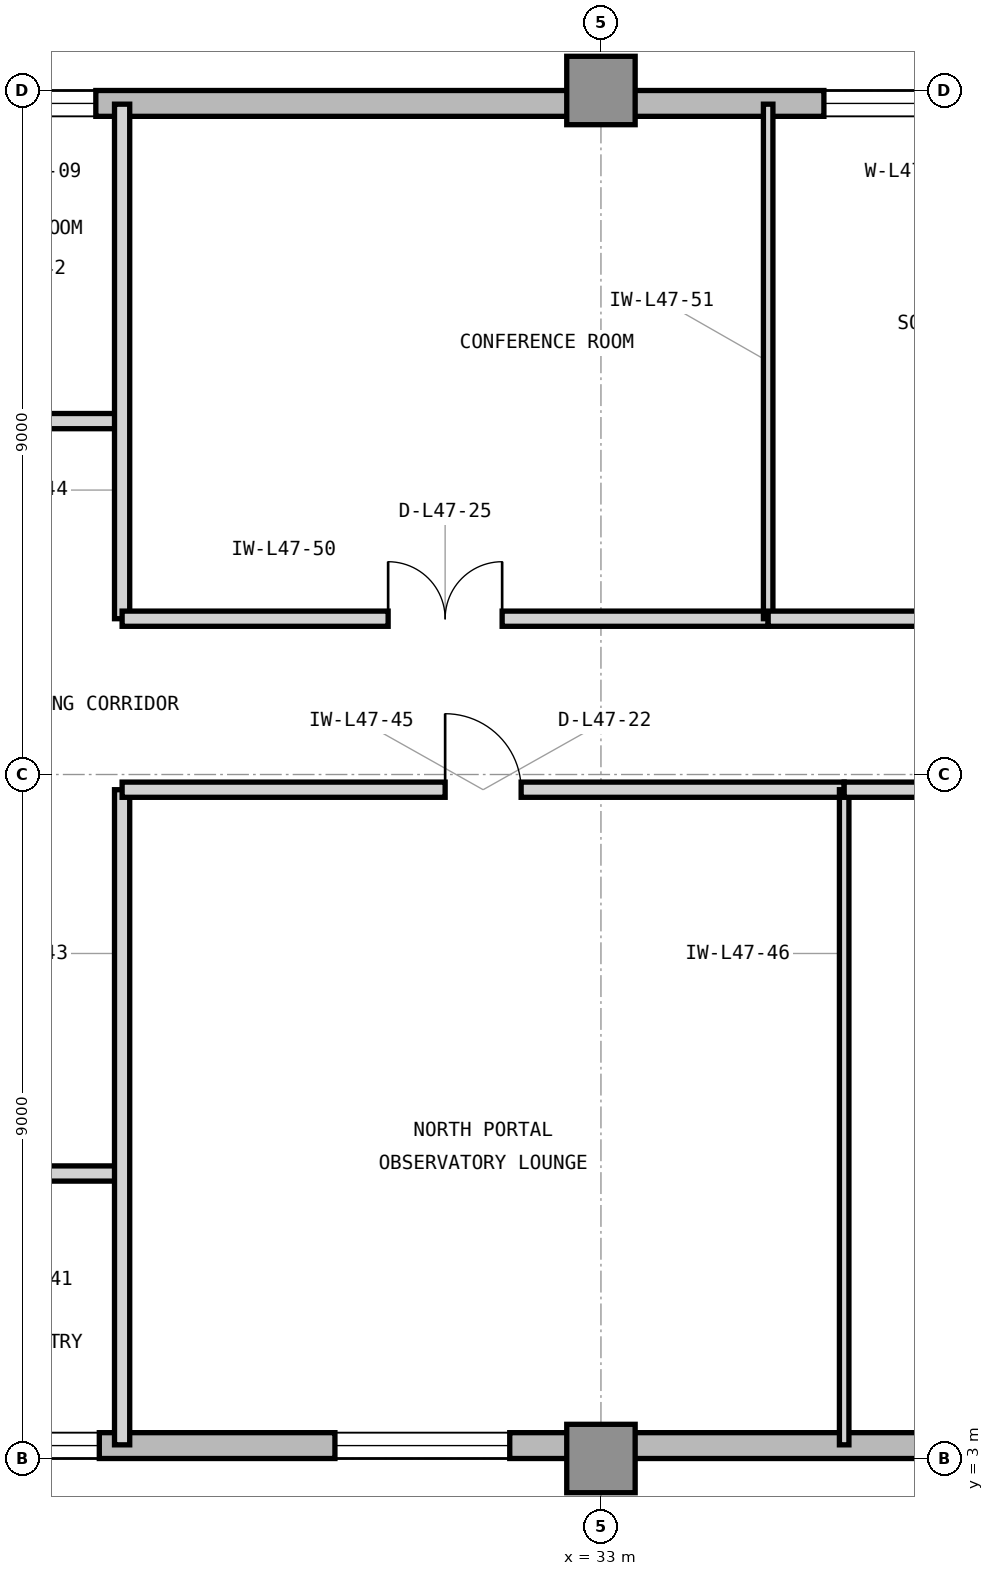
"""IFC4 building model, lengths in metres.
Left out: names, types, materials, properties, quantities, classifications, styles, units other than length and angle.
Written with IfcOpenShell. Run it as: python <this file> out.ifc"""

import sys

from ifc_helpers import new_model, si_unit, direction, frame, frame_2d, origin, origin_2d, place, context, subcontext, project, spatial, rectangle, extrude, element, fill, save


model = new_model("IFC4")
c1 = context("Model", 3, precision=1e-05, world=origin(), true_north=direction((0.0, 1.0)))
c2 = subcontext(c1, "Body", "Model", "MODEL_VIEW")
j1 = project(units=[si_unit("LENGTHUNIT", "METRE"), si_unit("PLANEANGLEUNIT", "RADIAN")], contexts=[c1])
p1 = place(None, origin())
s1 = spatial("IfcSite", under=j1, at=p1, CompositionType="ELEMENT")
p2 = place(p1, origin())
s2 = spatial("IfcBuilding", under=s1, at=p2, CompositionType="ELEMENT")
p3 = place(p2, frame((0.0, 0.0, 195.6)))
s3 = spatial("IfcBuildingStorey", under=s2, at=p3, CompositionType="ELEMENT", Elevation=195.6)
for number, where, z_axis, x_axis in (
    (1, (33.0, 3.0, 0.0), (0.0, 0.0, 1.0), (1.0, 0.0, 0.0)),
    (2, (33.0, 21.0, 0.0), (0.0, 0.0, 1.0), (1.0, 0.0, 0.0)),
):
    element("IfcColumn", number, at=place(p3, frame(where, z_axis=z_axis, x_axis=x_axis)), inside=s3, PredefinedType="COLUMN", context=c2, shape_type="SweptSolid", body=[
        extrude(rectangle(XDim=0.9, YDim=0.9, at=origin_2d()), origin(), (0.0, 0.0, 1.0), 3.9),
    ])
p4 = place(p3, frame((23.9, 3.17, 0.0), z_axis=(0.0, 0.0, 1.0), x_axis=(1.0, 0.0, 0.0)))
e3 = element("IfcWall", 3, at=p4, inside=s3, PredefinedType="STANDARD", context=c2, shape_type="SweptSolid", body=[
    extrude(rectangle(XDim=31.5, YDim=0.34, at=frame_2d((15.75, 0.0))), origin(), (0.0, 0.0, 1.0), 3.7),
])
p5 = place(p4, frame((5.6, 0.0, 0.9)))
e4 = element("IfcOpeningElement", 4, at=p5, cuts=e3, PredefinedType="OPENING", context=c2, shape_type="SweptSolid", body=[
    extrude(rectangle(XDim=2.3, YDim=2.2, at=frame_2d((1.15, 1.1))), frame((0.0, 0.18, 0.0), z_axis=(0.0, -1.0, 0.0), x_axis=(1.0, 0.0, 0.0)), (0.0, 0.0, 1.0), 0.36),
])
p6 = place(p4, frame((14.6, 0.0, 0.9)))
e5 = element("IfcOpeningElement", 5, at=p6, cuts=e3, PredefinedType="OPENING", context=c2, shape_type="SweptSolid", body=[
    extrude(rectangle(XDim=2.3, YDim=2.2, at=frame_2d((1.15, 1.1))), frame((0.0, 0.18, 0.0), z_axis=(0.0, -1.0, 0.0), x_axis=(1.0, 0.0, 0.0)), (0.0, 0.0, 1.0), 0.36),
])
p7 = place(p4, frame((0.9, 0.0, 0.9)))
e6 = element("IfcOpeningElement", 6, at=p7, cuts=e3, PredefinedType="OPENING", context=c2, shape_type="SweptSolid", body=[
    extrude(rectangle(XDim=1.6, YDim=2.2, at=frame_2d((0.8, 1.1))), frame((0.0, 0.18, 0.0), z_axis=(0.0, -1.0, 0.0), x_axis=(1.0, 0.0, 0.0)), (0.0, 0.0, 1.0), 0.36),
])
p8 = place(p4, frame((21.725, 0.0, 0.9)))
e7 = element("IfcOpeningElement", 7, at=p8, cuts=e3, PredefinedType="OPENING", context=c2, shape_type="SweptSolid", body=[
    extrude(rectangle(XDim=1.6, YDim=2.2, at=frame_2d((0.8, 1.1))), frame((0.0, 0.18, 0.0), z_axis=(0.0, -1.0, 0.0), x_axis=(1.0, 0.0, 0.0)), (0.0, 0.0, 1.0), 0.36),
])
p9 = place(p3, frame((55.4, 20.83, 0.0), z_axis=(0.0, 0.0, 1.0), x_axis=(-1.0, 0.0, 0.0)))
e8 = element("IfcWall", 8, at=p9, inside=s3, PredefinedType="STANDARD", context=c2, shape_type="SweptSolid", body=[
    extrude(rectangle(XDim=31.4, YDim=0.34, at=frame_2d((15.7, 0.0))), origin(), (0.0, 0.0, 1.0), 3.7),
])
p10 = place(p9, frame((17.167, 0.0, 0.9)))
e9 = element("IfcOpeningElement", 9, at=p10, cuts=e8, PredefinedType="OPENING", context=c2, shape_type="SweptSolid", body=[
    extrude(rectangle(XDim=2.3, YDim=2.2, at=frame_2d((1.15, 1.1))), frame((0.0, 0.18, 0.0), z_axis=(0.0, -1.0, 0.0), x_axis=(1.0, 0.0, 0.0)), (0.0, 0.0, 1.0), 0.36),
])
p11 = place(p9, frame((29.046, 0.0, 0.9)))
e10 = element("IfcOpeningElement", 10, at=p11, cuts=e8, PredefinedType="OPENING", context=c2, shape_type="SweptSolid", body=[
    extrude(rectangle(XDim=1.6, YDim=2.2, at=frame_2d((0.8, 1.1))), frame((0.0, 0.18, 0.0), z_axis=(0.0, -1.0, 0.0), x_axis=(1.0, 0.0, 0.0)), (0.0, 0.0, 1.0), 0.36),
])
p12 = place(p9, frame((8.375, 0.0, 0.9)))
e11 = element("IfcOpeningElement", 11, at=p12, cuts=e8, PredefinedType="OPENING", context=c2, shape_type="SweptSolid", body=[
    extrude(rectangle(XDim=2.3, YDim=2.2, at=frame_2d((1.15, 1.1))), frame((0.0, 0.18, 0.0), z_axis=(0.0, -1.0, 0.0), x_axis=(1.0, 0.0, 0.0)), (0.0, 0.0, 1.0), 0.36),
])
p13 = place(p3, frame((23.85, 6.75, 0.0), z_axis=(0.0, 0.0, 1.0), x_axis=(1.0, 0.0, 0.0)))
e12 = element("IfcWall", 12, at=p13, inside=s3, PredefinedType="PARTITIONING", context=c2, shape_type="SweptSolid", body=[
    extrude(rectangle(XDim=2.85, YDim=0.2, at=frame_2d((1.425, 0.0))), origin(), (0.0, 0.0, 1.0), 3.69),
])
p14 = place(p13, frame((0.7, 0.0, 0.0)))
e13 = element("IfcOpeningElement", 13, at=p14, cuts=e12, PredefinedType="OPENING", context=c2, shape_type="SweptSolid", body=[
    extrude(rectangle(XDim=1.0, YDim=2.15, at=frame_2d((0.5, 1.075))), frame((0.0, 0.11, 0.0), z_axis=(0.0, -1.0, 0.0), x_axis=(1.0, 0.0, 0.0)), (0.0, 0.0, 1.0), 0.22),
])
p15 = place(p3, frame((23.85, 16.65, 0.0), z_axis=(0.0, 0.0, 1.0), x_axis=(1.0, 0.0, 0.0)))
e14 = element("IfcWall", 14, at=p15, inside=s3, PredefinedType="PARTITIONING", context=c2, shape_type="SweptSolid", body=[
    extrude(rectangle(XDim=2.85, YDim=0.2, at=frame_2d((1.425, 0.0))), origin(), (0.0, 0.0, 1.0), 3.69),
])
p16 = place(p15, frame((0.7, 0.0, 0.0)))
e15 = element("IfcOpeningElement", 15, at=p16, cuts=e14, PredefinedType="OPENING", context=c2, shape_type="SweptSolid", body=[
    extrude(rectangle(XDim=1.0, YDim=2.15, at=frame_2d((0.5, 1.075))), frame((0.0, 0.11, 0.0), z_axis=(0.0, -1.0, 0.0), x_axis=(1.0, 0.0, 0.0)), (0.0, 0.0, 1.0), 0.22),
])
p17 = place(p3, frame((26.7, 3.18, 0.0), z_axis=(0.0, 0.0, 1.0), x_axis=(0.0, 1.0, 0.0)))
e16 = element("IfcWall", 16, at=p17, inside=s3, PredefinedType="PARTITIONING", context=c2, shape_type="SweptSolid", body=[
    extrude(rectangle(XDim=8.62, YDim=0.2, at=frame_2d((4.31, 0.0))), origin(), (0.0, 0.0, 1.0), 3.69),
])
p18 = place(p3, frame((26.7, 14.05, 0.0), z_axis=(0.0, 0.0, 1.0), x_axis=(0.0, 1.0, 0.0)))
e17 = element("IfcWall", 17, at=p18, inside=s3, PredefinedType="PARTITIONING", context=c2, shape_type="SweptSolid", body=[
    extrude(rectangle(XDim=6.77, YDim=0.2, at=frame_2d((3.385, 0.0))), origin(), (0.0, 0.0, 1.0), 3.69),
])
p19 = place(p3, frame((26.7, 11.8, 0.0), z_axis=(0.0, 0.0, 1.0), x_axis=(1.0, 0.0, 0.0)))
e18 = element("IfcWall", 18, at=p19, inside=s3, PredefinedType="PARTITIONING", context=c2, shape_type="SweptSolid", body=[
    extrude(rectangle(XDim=9.5, YDim=0.2, at=frame_2d((4.75, 0.0))), origin(), (0.0, 0.0, 1.0), 3.69),
])
p20 = place(p19, frame((4.25, 0.0, 0.0)))
e19 = element("IfcOpeningElement", 19, at=p20, cuts=e18, PredefinedType="OPENING", context=c2, shape_type="SweptSolid", body=[
    extrude(rectangle(XDim=1.0, YDim=2.15, at=frame_2d((0.5, 1.075))), frame((0.0, 0.11, 0.0), z_axis=(0.0, -1.0, 0.0), x_axis=(1.0, 0.0, 0.0)), (0.0, 0.0, 1.0), 0.22),
])
p21 = place(p3, frame((36.2, 3.18, 0.0), z_axis=(0.0, 0.0, 1.0), x_axis=(0.0, 1.0, 0.0)))
e20 = element("IfcWall", 20, at=p21, inside=s3, PredefinedType="PARTITIONING", context=c2, shape_type="SweptSolid", body=[
    extrude(rectangle(XDim=8.62, YDim=0.125, at=frame_2d((4.31, 0.0))), origin(), (0.0, 0.0, 1.0), 3.69),
])
p22 = place(p3, frame((36.2, 11.8, 0.0), z_axis=(0.0, 0.0, 1.0), x_axis=(1.0, 0.0, 0.0)))
e21 = element("IfcWall", 21, at=p22, inside=s3, PredefinedType="PARTITIONING", context=c2, shape_type="SweptSolid", body=[
    extrude(rectangle(XDim=9.0, YDim=0.2, at=frame_2d((4.5, 0.0))), origin(), (0.0, 0.0, 1.0), 3.69),
])
p23 = place(p22, frame((4.0, 0.0, 0.0)))
e22 = element("IfcOpeningElement", 22, at=p23, cuts=e21, PredefinedType="OPENING", context=c2, shape_type="SweptSolid", body=[
    extrude(rectangle(XDim=1.0, YDim=2.15, at=frame_2d((0.5, 1.075))), frame((0.0, 0.11, 0.0), z_axis=(0.0, -1.0, 0.0), x_axis=(1.0, 0.0, 0.0)), (0.0, 0.0, 1.0), 0.22),
])
p24 = place(p3, frame((26.7, 14.05, 0.0), z_axis=(0.0, 0.0, 1.0), x_axis=(1.0, 0.0, 0.0)))
e23 = element("IfcWall", 23, at=p24, inside=s3, PredefinedType="PARTITIONING", context=c2, shape_type="SweptSolid", body=[
    extrude(rectangle(XDim=8.5, YDim=0.2, at=frame_2d((4.25, 0.0))), origin(), (0.0, 0.0, 1.0), 3.69),
])
p25 = place(p24, frame((3.5, 0.0, 0.0)))
e24 = element("IfcOpeningElement", 24, at=p25, cuts=e23, PredefinedType="OPENING", context=c2, shape_type="SweptSolid", body=[
    extrude(rectangle(XDim=1.5, YDim=2.3, at=frame_2d((0.75, 1.15))), frame((0.0, 0.11, 0.0), z_axis=(0.0, -1.0, 0.0), x_axis=(1.0, 0.0, 0.0)), (0.0, 0.0, 1.0), 0.22),
])
p26 = place(p3, frame((35.2, 14.05, 0.0), z_axis=(0.0, 0.0, 1.0), x_axis=(0.0, 1.0, 0.0)))
e25 = element("IfcWall", 25, at=p26, inside=s3, PredefinedType="PARTITIONING", context=c2, shape_type="SweptSolid", body=[
    extrude(rectangle(XDim=6.77, YDim=0.125, at=frame_2d((3.385, 0.0))), origin(), (0.0, 0.0, 1.0), 3.69),
])
p27 = place(p3, frame((35.2, 14.05, 0.0), z_axis=(0.0, 0.0, 1.0), x_axis=(1.0, 0.0, 0.0)))
e26 = element("IfcWall", 26, at=p27, inside=s3, PredefinedType="PARTITIONING", context=c2, shape_type="SweptSolid", body=[
    extrude(rectangle(XDim=9.0, YDim=0.2, at=frame_2d((4.5, 0.0))), origin(), (0.0, 0.0, 1.0), 3.69),
])
p28 = place(p27, frame((4.0, 0.0, 0.0)))
e27 = element("IfcOpeningElement", 27, at=p28, cuts=e26, PredefinedType="OPENING", context=c2, shape_type="SweptSolid", body=[
    extrude(rectangle(XDim=1.0, YDim=2.15, at=frame_2d((0.5, 1.075))), frame((0.0, 0.11, 0.0), z_axis=(0.0, -1.0, 0.0), x_axis=(1.0, 0.0, 0.0)), (0.0, 0.0, 1.0), 0.22),
])
p29 = place(p5, origin())
e28 = element("IfcWindow", 28, at=p29, inside=s3, PartitioningType="SINGLE_PANEL", PredefinedType="WINDOW", context=c2, shape_type="SweptSolid", body=[
    extrude(rectangle(XDim=2.3, YDim=2.2, at=frame_2d((1.15, 1.1))), frame((0.0, 0.11, 0.0), z_axis=(0.0, -1.0, 0.0), x_axis=(1.0, 0.0, 0.0)), (0.0, 0.0, 1.0), 0.06),
])
fill(e4, e28)
p30 = place(p10, origin())
e29 = element("IfcWindow", 29, at=p30, inside=s3, PartitioningType="SINGLE_PANEL", PredefinedType="WINDOW", context=c2, shape_type="SweptSolid", body=[
    extrude(rectangle(XDim=2.3, YDim=2.2, at=frame_2d((1.15, 1.1))), frame((0.0, 0.11, 0.0), z_axis=(0.0, -1.0, 0.0), x_axis=(1.0, 0.0, 0.0)), (0.0, 0.0, 1.0), 0.06),
])
fill(e9, e29)
p31 = place(p20, origin())
e30 = element("IfcDoor", 30, at=p31, inside=s3, OperationType="SINGLE_SWING_LEFT", PredefinedType="DOOR", context=c2, shape_type="SweptSolid", body=[
    extrude(rectangle(XDim=1.0, YDim=2.15, at=frame_2d((0.5, 1.075))), frame((0.0, 0.025, 0.0), z_axis=(0.0, -1.0, 0.0), x_axis=(1.0, 0.0, 0.0)), (0.0, 0.0, 1.0), 0.05),
])
fill(e19, e30)
p32 = place(p25, origin())
e31 = element("IfcDoor", 31, at=p32, inside=s3, OperationType="DOUBLE_DOOR_SINGLE_SWING", PredefinedType="DOOR", context=c2, shape_type="SweptSolid", body=[
    extrude(rectangle(XDim=1.5, YDim=2.3, at=frame_2d((0.75, 1.15))), frame((0.0, 0.025, 0.0), z_axis=(0.0, -1.0, 0.0), x_axis=(1.0, 0.0, 0.0)), (0.0, 0.0, 1.0), 0.05),
])
fill(e24, e31)
p33 = place(p7, origin())
e32 = element("IfcWindow", 32, at=p33, inside=s3, PartitioningType="SINGLE_PANEL", PredefinedType="WINDOW", context=c2, shape_type="SweptSolid", body=[
    extrude(rectangle(XDim=1.6, YDim=2.2, at=frame_2d((0.8, 1.1))), frame((0.0, 0.11, 0.0), z_axis=(0.0, -1.0, 0.0), x_axis=(1.0, 0.0, 0.0)), (0.0, 0.0, 1.0), 0.06),
])
fill(e6, e32)
p34 = place(p11, origin())
e33 = element("IfcWindow", 33, at=p34, inside=s3, PartitioningType="SINGLE_PANEL", PredefinedType="WINDOW", context=c2, shape_type="SweptSolid", body=[
    extrude(rectangle(XDim=1.6, YDim=2.2, at=frame_2d((0.8, 1.1))), frame((0.0, 0.11, 0.0), z_axis=(0.0, -1.0, 0.0), x_axis=(1.0, 0.0, 0.0)), (0.0, 0.0, 1.0), 0.06),
])
fill(e10, e33)
save(model, sys.argv[1])
